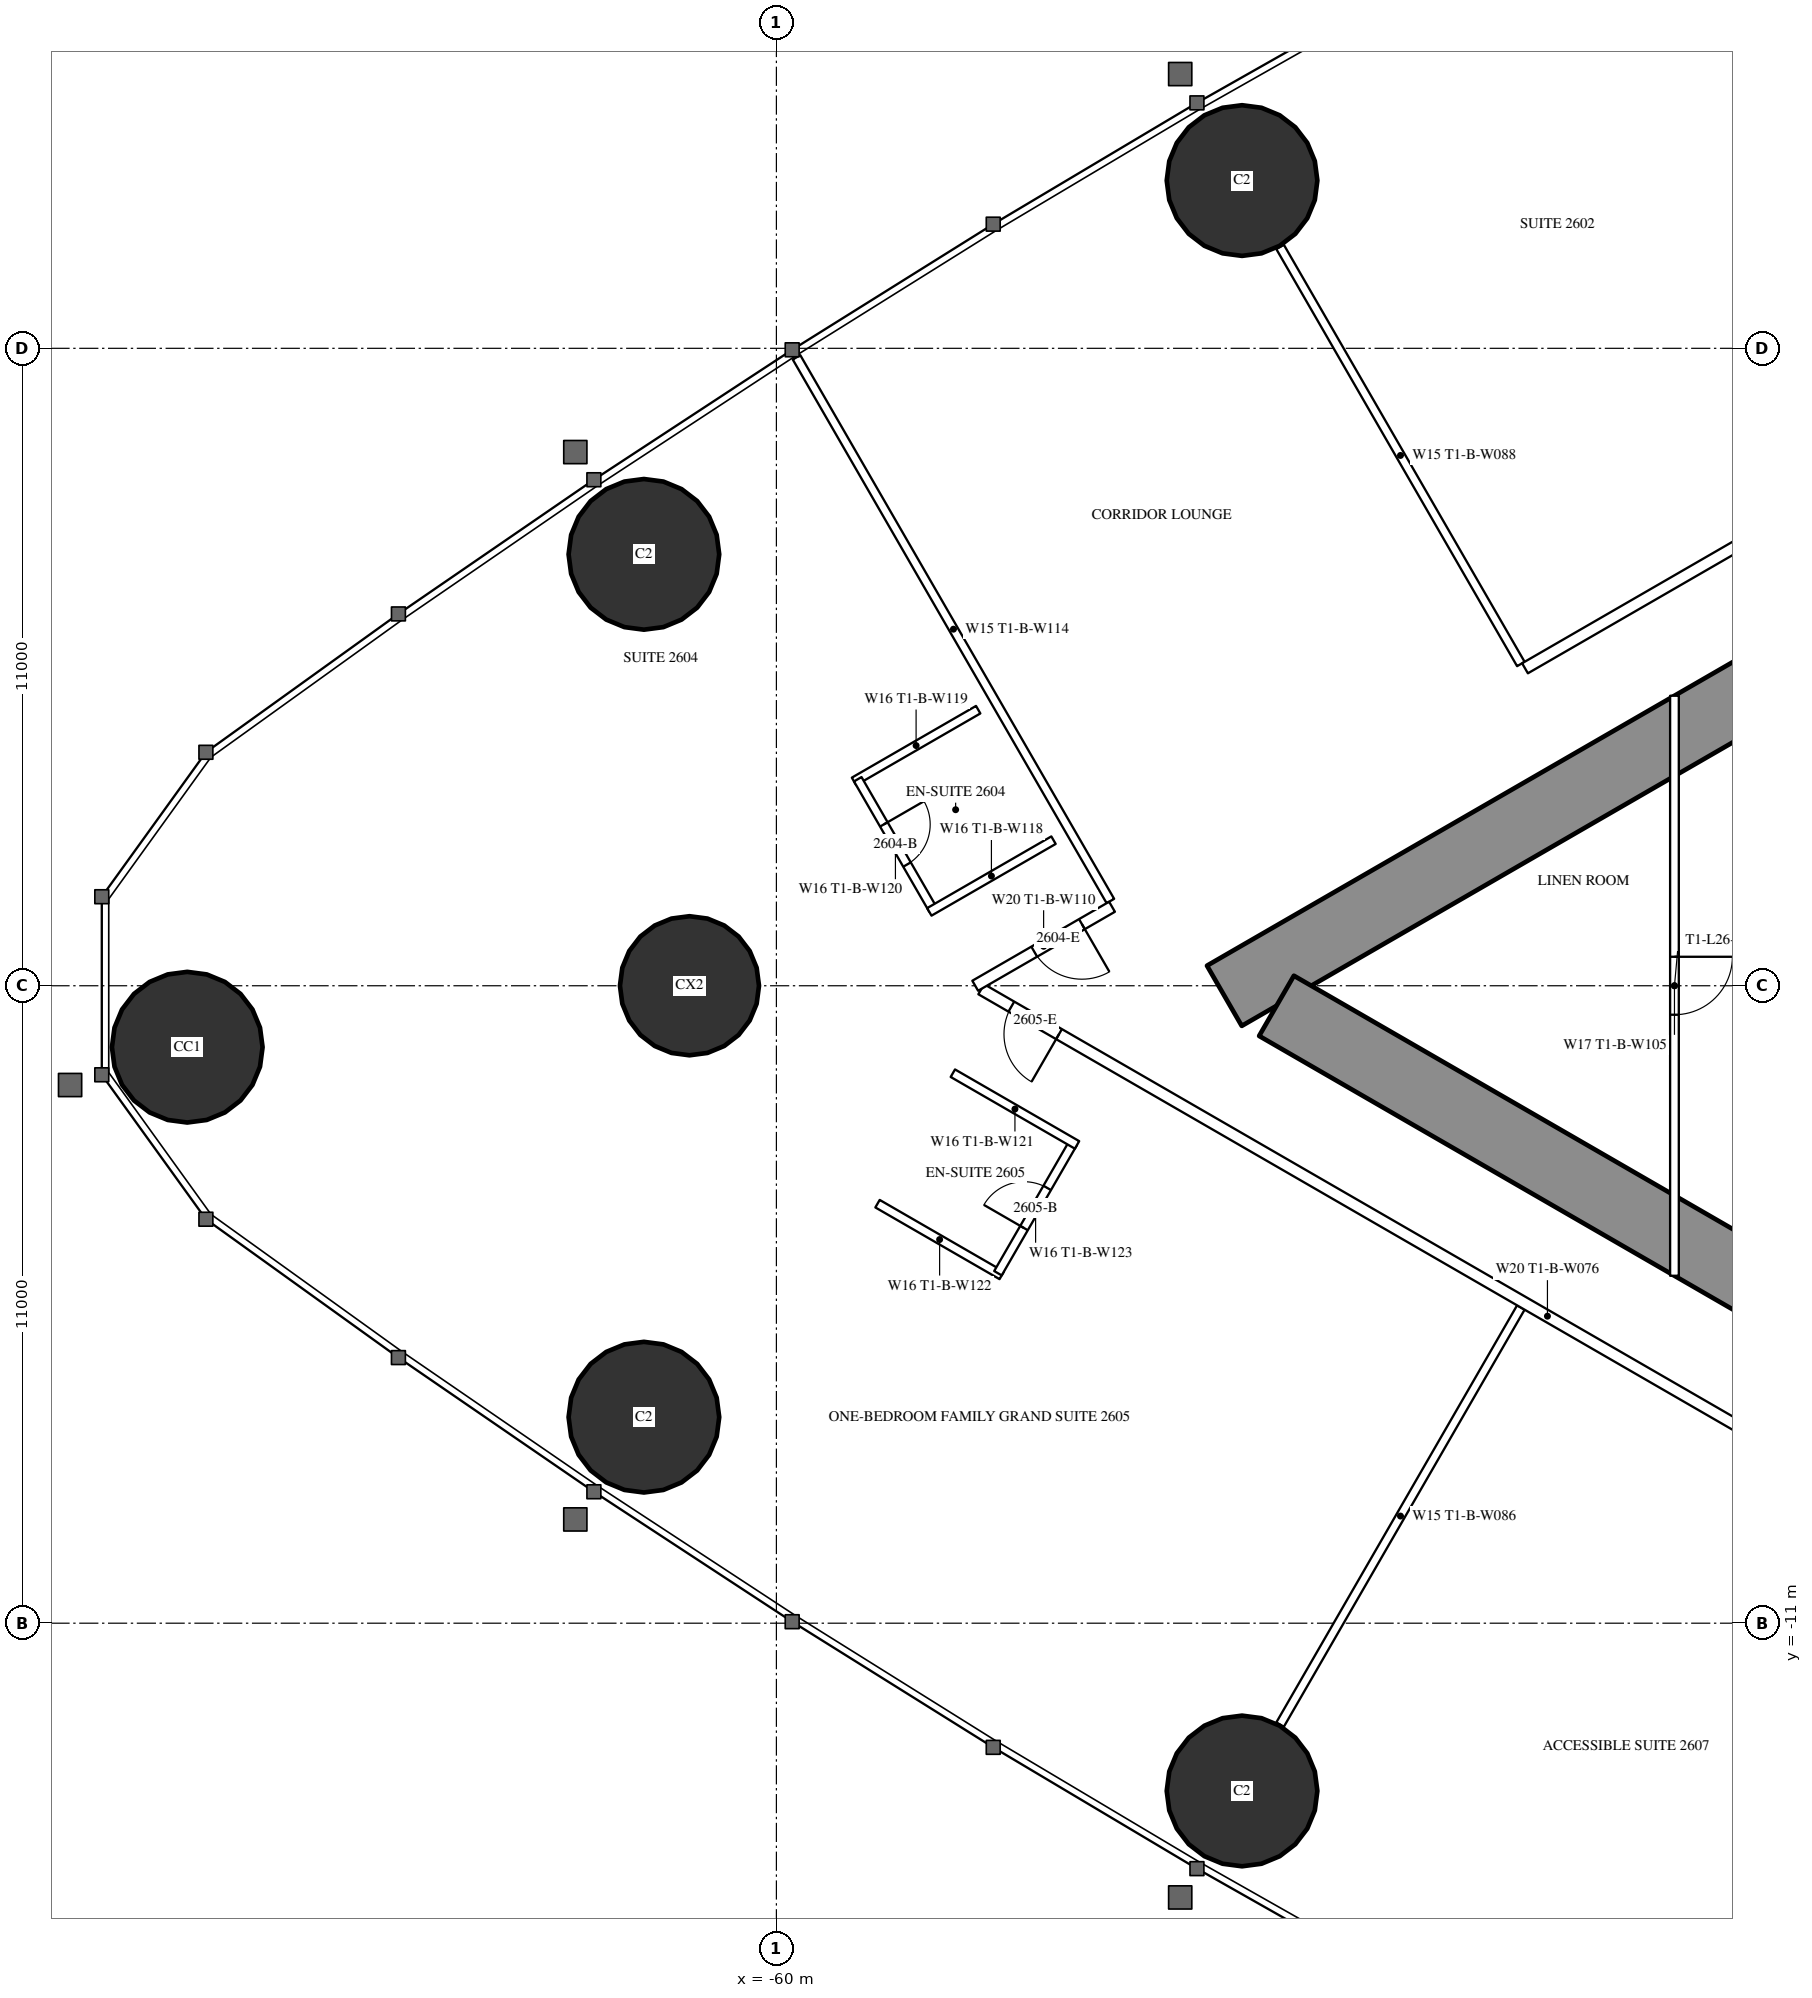
"""IFC4 building model, lengths in metres.
Left out: names, types, materials, properties, quantities, classifications, styles, units other than length and angle.
Written with IfcOpenShell. Run it as: python <this file> out.ifc"""

import sys

from ifc_helpers import new_model, si_unit, direction, frame, frame_2d, origin, origin_2d, place, context, subcontext, project, spatial, rectangle, circle, hollow_circle, extrude, element, fill, save


model = new_model("IFC4")
c1 = context("Model", 3, precision=1e-05, world=origin(), true_north=direction((0.0, 1.0)))
c2 = subcontext(c1, "Body", "Model", "MODEL_VIEW")
j1 = project(units=[si_unit("LENGTHUNIT", "METRE"), si_unit("PLANEANGLEUNIT", "RADIAN")], contexts=[c1])
p1 = place(None, origin())
s1 = spatial("IfcSite", under=j1, at=p1, CompositionType="ELEMENT")
p2 = place(p1, origin())
s2 = spatial("IfcBuilding", under=s1, at=p2, CompositionType="ELEMENT")
p3 = place(p2, frame((0.0, 0.0, 101.1)))
s3 = spatial("IfcBuildingStorey", under=s2, at=p3, CompositionType="ELEMENT", Elevation=101.1)
for number, where, z_axis, x_axis in (
    (1, (-70.168, -1.06, 0.0), (0.0, 0.0, 1.0), (1.0, 0.0, 0.0)),
    (2, (-62.287, -7.445, 0.0), (0.0, 0.0, 1.0), (1.0, 0.0, 0.0)),
    (3, (-51.963, -13.895, 0.0), (0.0, 0.0, 1.0), (1.0, 0.0, 0.0)),
    (4, (-51.963, 13.895, 0.0), (0.0, 0.0, 1.0), (1.0, 0.0, 0.0)),
    (5, (-62.287, 7.445, 0.0), (0.0, 0.0, 1.0), (1.0, 0.0, 0.0)),
):
    element("IfcColumn", number, at=place(p3, frame(where, z_axis=z_axis, x_axis=x_axis)), inside=s3, PredefinedType="COLUMN", context=c2, shape_type="SweptSolid", body=[
        extrude(hollow_circle(Radius=1.3, WallThickness=0.1, at=origin_2d()), origin(), (0.0, 0.0, 1.0), 3.5),
    ])
p4 = place(p3, frame((-61.5, 0.0, 0.0), z_axis=(0.0, 0.0, 1.0), x_axis=(1.0, 0.0, 0.0)))
e6 = element("IfcColumn", 6, at=p4, inside=s3, PredefinedType="COLUMN", context=c2, shape_type="SweptSolid", body=[
    extrude(circle(Radius=1.2, at=origin_2d()), origin(), (0.0, 0.0, 1.0), 3.5),
])
p5 = place(p3, frame((-27.2, 14.3, 0.0), z_axis=(0.0, 0.0, 1.0), x_axis=(-0.866026593062, -0.499997940104, 0.0)))
e7 = element("IfcWall", 7, at=p5, inside=s3, PredefinedType="SHEAR", context=c2, shape_type="SweptSolid", body=[
    extrude(rectangle(XDim=28.946, YDim=1.2, at=frame_2d((14.473, 0.0))), origin(), (0.0, 0.0, 1.0), 3.5),
])
p6 = place(p5, frame((4.6, 0.0, 0.0)))
e8 = element("IfcOpeningElement", 8, at=p6, cuts=e7, PredefinedType="OPENING", context=c2, shape_type="SweptSolid", body=[
    extrude(rectangle(XDim=1.0, YDim=2.2, at=frame_2d((0.5, 1.1))), frame((0.0, 0.61, 0.0), z_axis=(0.0, -1.0, 0.0), x_axis=(1.0, 0.0, 0.0)), (0.0, 0.0, 1.0), 1.22),
])
p7 = place(p5, frame((13.395, 0.0, 0.0)))
e9 = element("IfcOpeningElement", 9, at=p7, cuts=e7, PredefinedType="OPENING", context=c2, shape_type="SweptSolid", body=[
    extrude(rectangle(XDim=1.8, YDim=2.2, at=frame_2d((0.9, 1.1))), frame((0.0, 0.61, 0.0), z_axis=(0.0, -1.0, 0.0), x_axis=(1.0, 0.0, 0.0)), (0.0, 0.0, 1.0), 1.22),
])
p8 = place(p3, frame((-27.2, -14.3, 0.0), z_axis=(0.0, 0.0, 1.0), x_axis=(-0.866024021859, 0.500002393557, 0.0)))
e10 = element("IfcWall", 10, at=p8, inside=s3, PredefinedType="SHEAR", context=c2, shape_type="SweptSolid", body=[
    extrude(rectangle(XDim=27.907, YDim=1.2, at=frame_2d((13.954, 0.0))), origin(), (0.0, 0.0, 1.0), 3.5),
])
p9 = place(p8, frame((4.6, 0.0, 0.0)))
e11 = element("IfcOpeningElement", 11, at=p9, cuts=e10, PredefinedType="OPENING", context=c2, shape_type="SweptSolid", body=[
    extrude(rectangle(XDim=1.0, YDim=2.2, at=frame_2d((0.5, 1.1))), frame((0.0, 0.61, 0.0), z_axis=(0.0, -1.0, 0.0), x_axis=(1.0, 0.0, 0.0)), (0.0, 0.0, 1.0), 1.22),
])
p10 = place(p8, frame((13.395, 0.0, 0.0)))
e12 = element("IfcOpeningElement", 12, at=p10, cuts=e10, PredefinedType="OPENING", context=c2, shape_type="SweptSolid", body=[
    extrude(rectangle(XDim=1.8, YDim=2.2, at=frame_2d((0.9, 1.1))), frame((0.0, 0.61, 0.0), z_axis=(0.0, -1.0, 0.0), x_axis=(1.0, 0.0, 0.0)), (0.0, 0.0, 1.0), 1.22),
])
p11 = place(p3, frame((-47.151, 5.552, 0.0), z_axis=(0.0, 0.0, 1.0), x_axis=(-0.500003012045, 0.866023664773, 0.0)))
e13 = element("IfcWall", 13, at=p11, inside=s3, PredefinedType="PARTITIONING", context=c2, shape_type="SweptSolid", body=[
    extrude(rectangle(XDim=8.311, YDim=0.15, at=frame_2d((4.156, 0.0))), origin(), (0.0, 0.0, 1.0), 2.2),
])
p12 = place(p3, frame((-54.236, 1.462, 0.0), z_axis=(0.0, 0.0, 1.0), x_axis=(-0.499990351854, 0.866030974073, 0.0)))
e14 = element("IfcWall", 14, at=p12, inside=s3, PredefinedType="PARTITIONING", context=c2, shape_type="SweptSolid", body=[
    extrude(rectangle(XDim=10.834, YDim=0.15, at=frame_2d((5.417, 0.0))), origin(), (0.0, 0.0, 1.0), 3.25),
])
p13 = place(p3, frame((-47.151, -5.552, 0.0), z_axis=(0.0, 0.0, 1.0), x_axis=(-0.500003012045, -0.866023664773, 0.0)))
e15 = element("IfcWall", 15, at=p13, inside=s3, PredefinedType="PARTITIONING", context=c2, shape_type="SweptSolid", body=[
    extrude(rectangle(XDim=8.311, YDim=0.15, at=frame_2d((4.156, 0.0))), origin(), (0.0, 0.0, 1.0), 2.2),
])
p14 = place(p3, frame((-36.92, -11.344, 0.0), z_axis=(0.0, 0.0, 1.0), x_axis=(-0.866028313256, 0.499994960614, 0.0)))
e16 = element("IfcWall", 16, at=p14, inside=s3, PredefinedType="PARTITIONING", context=c2, shape_type="SweptSolid", body=[
    extrude(rectangle(XDim=22.568, YDim=0.2, at=frame_2d((11.284, 0.0))), origin(), (0.0, 0.0, 1.0), 3.25),
])
p15 = place(p14, frame((21.018, 0.0, 0.0)))
e17 = element("IfcOpeningElement", 17, at=p15, cuts=e16, PredefinedType="OPENING", context=c2, shape_type="SweptSolid", body=[
    extrude(rectangle(XDim=0.95, YDim=2.2, at=frame_2d((0.475, 1.1))), frame((0.0, 0.11, 0.0), z_axis=(0.0, -1.0, 0.0), x_axis=(1.0, 0.0, 0.0)), (0.0, 0.0, 1.0), 0.22),
])
p16 = place(p14, frame((3.35, 0.0, 0.0)))
e18 = element("IfcOpeningElement", 18, at=p16, cuts=e16, PredefinedType="OPENING", context=c2, shape_type="SweptSolid", body=[
    extrude(rectangle(XDim=1.0, YDim=2.2, at=frame_2d((0.5, 1.1))), frame((0.0, 0.11, 0.0), z_axis=(0.0, -1.0, 0.0), x_axis=(1.0, 0.0, 0.0)), (0.0, 0.0, 1.0), 0.22),
])
p17 = place(p3, frame((-37.7, 10.894, 0.0), z_axis=(0.0, 0.0, 1.0), x_axis=(-0.866027551079, -0.499996280759, 0.0)))
e19 = element("IfcWall", 19, at=p17, inside=s3, PredefinedType="PARTITIONING", context=c2, shape_type="SweptSolid", body=[
    extrude(rectangle(XDim=10.831, YDim=0.2, at=frame_2d((5.415, 0.0))), origin(), (0.0, 0.0, 1.0), 3.25),
])
p18 = place(p17, frame((0.6, 0.0, 0.0)))
e20 = element("IfcOpeningElement", 20, at=p18, cuts=e19, PredefinedType="OPENING", context=c2, shape_type="SweptSolid", body=[
    extrude(rectangle(XDim=0.95, YDim=2.2, at=frame_2d((0.475, 1.1))), frame((0.0, 0.11, 0.0), z_axis=(0.0, -1.0, 0.0), x_axis=(1.0, 0.0, 0.0)), (0.0, 0.0, 1.0), 0.22),
])
p19 = place(p3, frame((-54.207, 1.363, 0.0), z_axis=(0.0, 0.0, 1.0), x_axis=(-0.866046902845, -0.499962760685, 0.0)))
e21 = element("IfcWall", 21, at=p19, inside=s3, PredefinedType="PARTITIONING", context=c2, shape_type="SweptSolid", body=[
    extrude(rectangle(XDim=2.726, YDim=0.2, at=frame_2d((1.363, 0.0))), origin(), (0.0, 0.0, 1.0), 3.25),
])
p20 = place(p19, frame((0.6, 0.0, 0.0)))
e22 = element("IfcOpeningElement", 22, at=p20, cuts=e21, PredefinedType="OPENING", context=c2, shape_type="SweptSolid", body=[
    extrude(rectangle(XDim=0.95, YDim=2.2, at=frame_2d((0.475, 1.1))), frame((0.0, 0.11, 0.0), z_axis=(0.0, -1.0, 0.0), x_axis=(1.0, 0.0, 0.0)), (0.0, 0.0, 1.0), 0.22),
])
p21 = place(p3, frame((-56.517, 4.764, 0.0), z_axis=(0.0, 0.0, 1.0), x_axis=(-0.866031185235, -0.4999899861, 0.0)))
e23 = element("IfcWall", 23, at=p21, inside=s3, PredefinedType="PARTITIONING", context=c2, shape_type="SweptSolid", body=[
    extrude(rectangle(XDim=2.475, YDim=0.15, at=frame_2d((1.238, 0.0))), origin(), (0.0, 0.0, 1.0), 3.25),
])
p22 = place(p3, frame((-57.296, 1.312, 0.0), z_axis=(0.0, 0.0, 1.0), x_axis=(-0.49997716683, 0.86603858612, 0.0)))
e24 = element("IfcWall", 24, at=p22, inside=s3, PredefinedType="PARTITIONING", context=c2, shape_type="SweptSolid", body=[
    extrude(rectangle(XDim=2.6, YDim=0.15, at=frame_2d((1.3, 0.0))), origin(), (0.0, 0.0, 1.0), 3.25),
])
p23 = place(p22, frame((0.9, 0.0, 0.0)))
e25 = element("IfcOpeningElement", 25, at=p23, cuts=e24, PredefinedType="OPENING", context=c2, shape_type="SweptSolid", body=[
    extrude(rectangle(XDim=0.8, YDim=2.2, at=frame_2d((0.4, 1.1))), frame((0.0, 0.085, 0.0), z_axis=(0.0, -1.0, 0.0), x_axis=(1.0, 0.0, 0.0)), (0.0, 0.0, 1.0), 0.17),
])
for number, where, z_axis, x_axis in (
    (26, (-55.217, 2.512, 0.0), (0.0, 0.0, 1.0), (-0.866, -0.5, 0.0)),
    (27, (-56.111, -4.998, 0.0), (0.0, 0.0, 1.0), (-0.866, 0.5, 0.0)),
):
    element("IfcWall", number, at=place(p3, frame(where, z_axis=z_axis, x_axis=x_axis)), inside=s3, PredefinedType="PARTITIONING", context=c2, shape_type="SweptSolid", body=[
        extrude(rectangle(XDim=2.475, YDim=0.15, at=frame_2d((1.238, 0.0))), origin(), (0.0, 0.0, 1.0), 3.25),
    ])
p24 = place(p3, frame((-54.876, -2.709, 0.0), z_axis=(0.0, 0.0, 1.0), x_axis=(-0.500006934395, -0.866021400173, 0.0)))
e28 = element("IfcWall", 28, at=p24, inside=s3, PredefinedType="PARTITIONING", context=c2, shape_type="SweptSolid", body=[
    extrude(rectangle(XDim=2.6, YDim=0.15, at=frame_2d((1.3, 0.0))), origin(), (0.0, 0.0, 1.0), 3.25),
])
p25 = place(p24, frame((0.9, 0.0, 0.0)))
e29 = element("IfcOpeningElement", 29, at=p25, cuts=e28, PredefinedType="OPENING", context=c2, shape_type="SweptSolid", body=[
    extrude(rectangle(XDim=0.8, YDim=2.2, at=frame_2d((0.4, 1.1))), frame((0.0, 0.085, 0.0), z_axis=(0.0, -1.0, 0.0), x_axis=(1.0, 0.0, 0.0)), (0.0, 0.0, 1.0), 0.17),
])
p26 = place(p3, frame((-54.811, -2.747, 0.0), z_axis=(0.0, 0.0, 1.0), x_axis=(-0.866031185235, 0.4999899861, 0.0)))
e30 = element("IfcWall", 30, at=p26, inside=s3, PredefinedType="PARTITIONING", context=c2, shape_type="SweptSolid", body=[
    extrude(rectangle(XDim=2.475, YDim=0.15, at=frame_2d((1.238, 0.0))), origin(), (0.0, 0.0, 1.0), 3.25),
])
p27 = place(p3, frame((-44.5, 5.005, 0.0), z_axis=(0.0, 0.0, 1.0), x_axis=(0.0, -1.0, 0.0)))
e31 = element("IfcWall", 31, at=p27, inside=s3, PredefinedType="PARTITIONING", context=c2, shape_type="SweptSolid", body=[
    extrude(rectangle(XDim=10.009, YDim=0.15, at=frame_2d((5.005, 0.0))), origin(), (0.0, 0.0, 1.0), 2.45),
])
p28 = place(p27, frame((4.505, 0.0, 0.0)))
e32 = element("IfcOpeningElement", 32, at=p28, cuts=e31, PredefinedType="OPENING", context=c2, shape_type="SweptSolid", body=[
    extrude(rectangle(XDim=1.0, YDim=2.2, at=frame_2d((0.5, 1.1))), frame((0.0, 0.085, 0.0), z_axis=(0.0, -1.0, 0.0), x_axis=(1.0, 0.0, 0.0)), (0.0, 0.0, 1.0), 0.17),
])
p29 = place(p23, origin())
e33 = element("IfcDoor", 33, at=p29, inside=s3, OperationType="SINGLE_SWING_RIGHT", PredefinedType="DOOR", context=c2, shape_type="SweptSolid", body=[
    extrude(rectangle(XDim=0.8, YDim=2.2, at=frame_2d((0.4, 1.1))), frame((0.0, 0.025, 0.0), z_axis=(0.0, -1.0, 0.0), x_axis=(1.0, 0.0, 0.0)), (0.0, 0.0, 1.0), 0.05),
])
fill(e25, e33)
p30 = place(p20, origin())
e34 = element("IfcDoor", 34, at=p30, inside=s3, OperationType="SINGLE_SWING_LEFT", PredefinedType="DOOR", context=c2, shape_type="SweptSolid", body=[
    extrude(rectangle(XDim=0.95, YDim=2.2, at=frame_2d((0.475, 1.1))), frame((0.0, 0.025, 0.0), z_axis=(0.0, -1.0, 0.0), x_axis=(1.0, 0.0, 0.0)), (0.0, 0.0, 1.0), 0.05),
])
fill(e22, e34)
p31 = place(p25, origin())
e35 = element("IfcDoor", 35, at=p31, inside=s3, OperationType="SINGLE_SWING_RIGHT", PredefinedType="DOOR", context=c2, shape_type="SweptSolid", body=[
    extrude(rectangle(XDim=0.8, YDim=2.2, at=frame_2d((0.4, 1.1))), frame((0.0, 0.025, 0.0), z_axis=(0.0, -1.0, 0.0), x_axis=(1.0, 0.0, 0.0)), (0.0, 0.0, 1.0), 0.05),
])
fill(e29, e35)
p32 = place(p15, origin())
e36 = element("IfcDoor", 36, at=p32, inside=s3, OperationType="SINGLE_SWING_LEFT", PredefinedType="DOOR", context=c2, shape_type="SweptSolid", body=[
    extrude(rectangle(XDim=0.95, YDim=2.2, at=frame_2d((0.475, 1.1))), frame((0.0, 0.025, 0.0), z_axis=(0.0, -1.0, 0.0), x_axis=(1.0, 0.0, 0.0)), (0.0, 0.0, 1.0), 0.05),
])
fill(e17, e36)
p33 = place(p28, origin())
e37 = element("IfcDoor", 37, at=p33, inside=s3, OperationType="SINGLE_SWING_LEFT", PredefinedType="DOOR", context=c2, shape_type="SweptSolid", body=[
    extrude(rectangle(XDim=1.0, YDim=2.2, at=frame_2d((0.5, 1.1))), frame((0.0, 0.025, 0.0), z_axis=(0.0, -1.0, 0.0), x_axis=(1.0, 0.0, 0.0)), (0.0, 0.0, 1.0), 0.05),
])
fill(e32, e37)
save(model, sys.argv[1])
